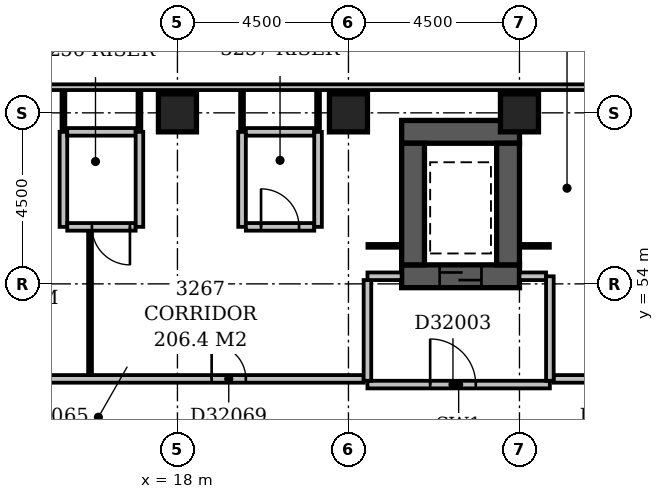
"""IFC4 building model, lengths in metres.
Left out: names, types, materials, properties, quantities, classifications, styles, units other than length and angle.
Written with IfcOpenShell. Run it as: python <this file> out.ifc"""

import sys

from ifc_helpers import new_model, si_unit, direction, frame, frame_2d, origin, origin_2d, place, context, subcontext, project, spatial, rectangle, extrude, element, fill, save


model = new_model("IFC4")
c1 = context("Model", 3, precision=1e-05, world=origin(), true_north=direction((0.0, 1.0)))
c2 = subcontext(c1, "Body", "Model", "MODEL_VIEW")
j1 = project(units=[si_unit("LENGTHUNIT", "METRE"), si_unit("PLANEANGLEUNIT", "RADIAN")], contexts=[c1])
p1 = place(None, origin())
s1 = spatial("IfcSite", under=j1, at=p1, CompositionType="ELEMENT")
p2 = place(p1, origin())
s2 = spatial("IfcBuilding", under=s1, at=p2, CompositionType="ELEMENT")
p3 = place(p2, frame((0.0, 0.0, 130.4)))
s3 = spatial("IfcBuildingStorey", under=s2, at=p3, CompositionType="ELEMENT", Elevation=130.4)
p4 = place(p3, frame((23.9, 54.2, -0.3), z_axis=(0.0, 0.0, 1.0), x_axis=(1.0, 0.0, 0.0)))
e1 = element("IfcWall", 1, at=p4, inside=s3, PredefinedType="SHEAR", context=c2, shape_type="SweptSolid", body=[
    extrude(rectangle(XDim=3.1, YDim=0.6, at=frame_2d((1.55, 0.0))), origin(), (0.0, 0.0, 1.0), 3.6),
])
p5 = place(p4, frame((1.0, 0.0, 0.3)))
e2 = element("IfcOpeningElement", 2, at=p5, cuts=e1, PredefinedType="OPENING", context=c2, shape_type="SweptSolid", body=[
    extrude(rectangle(XDim=1.1, YDim=2.1, at=frame_2d((0.55, 1.05))), frame((0.0, 0.312, 0.0), z_axis=(0.0, -1.0, 0.0), x_axis=(1.0, 0.0, 0.0)), (0.0, 0.0, 1.0), 0.624),
])
p6 = place(p3, frame((23.9, 58.0, -0.3), z_axis=(0.0, 0.0, 1.0), x_axis=(1.0, 0.0, 0.0)))
e3 = element("IfcWall", 3, at=p6, inside=s3, PredefinedType="SHEAR", context=c2, shape_type="SweptSolid", body=[
    extrude(rectangle(XDim=3.1, YDim=0.6, at=frame_2d((1.55, 0.0))), origin(), (0.0, 0.0, 1.0), 3.6),
])
for number, where, z_axis, x_axis in (
    (4, (24.2, 54.5, -0.3), (0.0, 0.0, 1.0), (0.0, 1.0, 0.0)),
    (5, (26.7, 54.5, -0.3), (0.0, 0.0, 1.0), (0.0, 1.0, 0.0)),
):
    element("IfcWall", number, at=place(p3, frame(where, z_axis=z_axis, x_axis=x_axis)), inside=s3, PredefinedType="SHEAR", context=c2, shape_type="SweptSolid", body=[
        extrude(rectangle(XDim=3.2, YDim=0.6, at=frame_2d((1.6, 0.0))), origin(), (0.0, 0.0, 1.0), 3.6),
    ])
for number, where, z_axis, x_axis in (
    (6, (18.0, 58.5, -0.3), (0.0, 0.0, 1.0), (1.0, 0.0, 0.0)),
    (7, (22.5, 58.5, -0.3), (0.0, 0.0, 1.0), (1.0, 0.0, 0.0)),
    (8, (27.0, 58.5, -0.3), (0.0, 0.0, 1.0), (1.0, 0.0, 0.0)),
):
    element("IfcColumn", number, at=place(p3, frame(where, z_axis=z_axis, x_axis=x_axis)), inside=s3, PredefinedType="COLUMN", context=c2, shape_type="SweptSolid", body=[
        extrude(rectangle(XDim=1.0, YDim=1.0, at=origin_2d()), origin(), (0.0, 0.0, 1.0), 3.6),
    ])
p7 = place(p3, frame((68.1, 59.175, 0.0), z_axis=(0.0, 0.0, 1.0), x_axis=(-1.0, 0.0, 0.0)))
e9 = element("IfcWall", 9, at=p7, inside=s3, PredefinedType="STANDARD", context=c2, shape_type="SweptSolid", body=[
    extrude(rectangle(XDim=68.85, YDim=0.15, at=frame_2d((34.425, 0.0))), origin(), (0.0, 0.0, 1.0), 2.7),
])
p8 = place(p3, frame((23.0, 51.35, 0.0), z_axis=(0.0, 0.0, 1.0), x_axis=(1.0, 0.0, 0.0)))
e10 = element("IfcWall", 10, at=p8, inside=s3, PredefinedType="PARTITIONING", context=c2, shape_type="SweptSolid", body=[
    extrude(rectangle(XDim=4.8, YDim=0.2, at=frame_2d((2.4, 0.0))), origin(), (0.0, 0.0, 1.0), 3.3),
])
p9 = place(p8, frame((1.65, 0.0, 0.0)))
e11 = element("IfcOpeningElement", 11, at=p9, cuts=e10, PredefinedType="OPENING", context=c2, shape_type="SweptSolid", body=[
    extrude(rectangle(XDim=1.2, YDim=2.1, at=frame_2d((0.6, 1.05))), frame((0.0, 0.112, 0.0), z_axis=(0.0, -1.0, 0.0), x_axis=(1.0, 0.0, 0.0)), (0.0, 0.0, 1.0), 0.224),
])
p10 = place(p3, frame((27.8, 51.45, 0.0), z_axis=(0.0, 0.0, 1.0), x_axis=(0.0, 1.0, 0.0)))
e12 = element("IfcWall", 12, at=p10, inside=s3, PredefinedType="PARTITIONING", context=c2, shape_type="SweptSolid", body=[
    extrude(rectangle(XDim=2.75, YDim=0.2, at=frame_2d((1.375, 0.0))), origin(), (0.0, 0.0, 1.0), 3.3),
])
p11 = place(p3, frame((23.0, 54.2, 0.0), z_axis=(0.0, 0.0, 1.0), x_axis=(1.0, 0.0, 0.0)))
e13 = element("IfcWall", 13, at=p11, inside=s3, PredefinedType="PARTITIONING", context=c2, shape_type="SweptSolid", body=[
    extrude(rectangle(XDim=0.9, YDim=0.2, at=frame_2d((0.45, 0.0))), origin(), (0.0, 0.0, 1.0), 3.3),
])
p12 = place(p3, frame((27.0, 54.2, 0.0), z_axis=(0.0, 0.0, 1.0), x_axis=(1.0, 0.0, 0.0)))
e14 = element("IfcWall", 14, at=p12, inside=s3, PredefinedType="PARTITIONING", context=c2, shape_type="SweptSolid", body=[
    extrude(rectangle(XDim=0.7, YDim=0.2, at=frame_2d((0.35, 0.0))), origin(), (0.0, 0.0, 1.0), 3.3),
])
p13 = place(p3, frame((23.0, 51.45, 0.0), z_axis=(0.0, 0.0, 1.0), x_axis=(0.0, 1.0, 0.0)))
e15 = element("IfcWall", 15, at=p13, inside=s3, PredefinedType="PARTITIONING", context=c2, shape_type="SweptSolid", body=[
    extrude(rectangle(XDim=2.65, YDim=0.2, at=frame_2d((1.325, 0.0))), origin(), (0.0, 0.0, 1.0), 3.3),
])
p14 = place(p3, frame((7.6, 51.5, 0.0), z_axis=(0.0, 0.0, 1.0), x_axis=(1.0, 0.0, 0.0)))
e16 = element("IfcWall", 16, at=p14, inside=s3, PredefinedType="PARTITIONING", context=c2, shape_type="SweptSolid", body=[
    extrude(rectangle(XDim=15.3, YDim=0.2, at=frame_2d((7.65, 0.0))), origin(), (0.0, 0.0, 1.0), 3.3),
])
p15 = place(p14, frame((3.55, 0.0, 0.0)))
e17 = element("IfcOpeningElement", 17, at=p15, cuts=e16, PredefinedType="OPENING", context=c2, shape_type="SweptSolid", body=[
    extrude(rectangle(XDim=0.9, YDim=2.1, at=frame_2d((0.45, 1.05))), frame((0.0, 0.112, 0.0), z_axis=(0.0, -1.0, 0.0), x_axis=(1.0, 0.0, 0.0)), (0.0, 0.0, 1.0), 0.224),
])
p16 = place(p14, frame((11.3, 0.0, 0.0)))
e18 = element("IfcOpeningElement", 18, at=p16, cuts=e16, PredefinedType="OPENING", context=c2, shape_type="SweptSolid", body=[
    extrude(rectangle(XDim=0.9, YDim=2.1, at=frame_2d((0.45, 1.05))), frame((0.0, 0.112, 0.0), z_axis=(0.0, -1.0, 0.0), x_axis=(1.0, 0.0, 0.0)), (0.0, 0.0, 1.0), 0.224),
])
p17 = place(p3, frame((27.9, 51.5, 0.0), z_axis=(0.0, 0.0, 1.0), x_axis=(1.0, 0.0, 0.0)))
e19 = element("IfcWall", 19, at=p17, inside=s3, PredefinedType="PARTITIONING", context=c2, shape_type="SweptSolid", body=[
    extrude(rectangle(XDim=9.3, YDim=0.2, at=frame_2d((4.65, 0.0))), origin(), (0.0, 0.0, 1.0), 3.3),
])
p18 = place(p17, frame((1.5, 0.0, 0.0)))
e20 = element("IfcOpeningElement", 20, at=p18, cuts=e19, PredefinedType="OPENING", context=c2, shape_type="SweptSolid", body=[
    extrude(rectangle(XDim=1.0, YDim=2.1, at=frame_2d((0.5, 1.05))), frame((0.0, 0.112, 0.0), z_axis=(0.0, -1.0, 0.0), x_axis=(1.0, 0.0, 0.0)), (0.0, 0.0, 1.0), 0.224),
])
p19 = place(p17, frame((6.3, 0.0, 0.0)))
e21 = element("IfcOpeningElement", 21, at=p19, cuts=e19, PredefinedType="OPENING", context=c2, shape_type="SweptSolid", body=[
    extrude(rectangle(XDim=0.9, YDim=2.1, at=frame_2d((0.45, 1.05))), frame((0.0, 0.112, 0.0), z_axis=(0.0, -1.0, 0.0), x_axis=(1.0, 0.0, 0.0)), (0.0, 0.0, 1.0), 0.224),
])
p20 = place(p3, frame((15.7, 51.6, 0.0), z_axis=(0.0, 0.0, 1.0), x_axis=(0.0, 1.0, 0.0)))
e22 = element("IfcWall", 22, at=p20, inside=s3, PredefinedType="PARTITIONING", context=c2, shape_type="SweptSolid", body=[
    extrude(rectangle(XDim=3.8, YDim=0.1, at=frame_2d((1.9, 0.0))), origin(), (0.0, 0.0, 1.0), 3.3),
])
p21 = place(p3, frame((23.0, 55.0, 0.0), z_axis=(0.0, 0.0, 1.0), x_axis=(1.0, 0.0, 0.0)))
e23 = element("IfcWall", 23, at=p21, inside=s3, PredefinedType="PARTITIONING", context=c2, shape_type="SweptSolid", body=[
    extrude(rectangle(XDim=0.9, YDim=0.1, at=frame_2d((0.45, 0.0))), origin(), (0.0, 0.0, 1.0), 3.3),
])
p22 = place(p3, frame((27.0, 55.0, 0.0), z_axis=(0.0, 0.0, 1.0), x_axis=(1.0, 0.0, 0.0)))
e24 = element("IfcWall", 24, at=p22, inside=s3, PredefinedType="PARTITIONING", context=c2, shape_type="SweptSolid", body=[
    extrude(rectangle(XDim=0.8, YDim=0.1, at=frame_2d((0.4, 0.0))), origin(), (0.0, 0.0, 1.0), 3.3),
])
p23 = place(p3, frame((15.0, 55.5, 0.0), z_axis=(0.0, 0.0, 1.0), x_axis=(0.0, 1.0, 0.0)))
e25 = element("IfcWall", 25, at=p23, inside=s3, PredefinedType="PARTITIONING", context=c2, shape_type="SweptSolid", body=[
    extrude(rectangle(XDim=2.5, YDim=0.2, at=frame_2d((1.25, 0.0))), origin(), (0.0, 0.0, 1.0), 3.3),
])
p24 = place(p3, frame((15.1, 55.5, 0.0), z_axis=(0.0, 0.0, 1.0), x_axis=(1.0, 0.0, 0.0)))
e26 = element("IfcWall", 26, at=p24, inside=s3, PredefinedType="PARTITIONING", context=c2, shape_type="SweptSolid", body=[
    extrude(rectangle(XDim=1.8, YDim=0.2, at=frame_2d((0.9, 0.0))), origin(), (0.0, 0.0, 1.0), 3.3),
])
p25 = place(p24, frame((0.65, 0.0, 0.0)))
e27 = element("IfcOpeningElement", 27, at=p25, cuts=e26, PredefinedType="OPENING", context=c2, shape_type="SweptSolid", body=[
    extrude(rectangle(XDim=1.0, YDim=2.1, at=frame_2d((0.5, 1.05))), frame((0.0, 0.112, 0.0), z_axis=(0.0, -1.0, 0.0), x_axis=(1.0, 0.0, 0.0)), (0.0, 0.0, 1.0), 0.224),
])
for number, where, z_axis, x_axis in (
    (28, (17.0, 55.5, 0.0), (0.0, 0.0, 1.0), (0.0, 1.0, 0.0)),
    (29, (19.7, 55.5, 0.0), (0.0, 0.0, 1.0), (0.0, 1.0, 0.0)),
):
    element("IfcWall", number, at=place(p3, frame(where, z_axis=z_axis, x_axis=x_axis)), inside=s3, PredefinedType="PARTITIONING", context=c2, shape_type="SweptSolid", body=[
        extrude(rectangle(XDim=2.5, YDim=0.2, at=frame_2d((1.25, 0.0))), origin(), (0.0, 0.0, 1.0), 3.3),
    ])
p26 = place(p3, frame((19.8, 55.5, 0.0), z_axis=(0.0, 0.0, 1.0), x_axis=(1.0, 0.0, 0.0)))
e30 = element("IfcWall", 30, at=p26, inside=s3, PredefinedType="PARTITIONING", context=c2, shape_type="SweptSolid", body=[
    extrude(rectangle(XDim=1.8, YDim=0.2, at=frame_2d((0.9, 0.0))), origin(), (0.0, 0.0, 1.0), 3.3),
])
p27 = place(p26, frame((0.4, 0.0, 0.0)))
e31 = element("IfcOpeningElement", 31, at=p27, cuts=e30, PredefinedType="OPENING", context=c2, shape_type="SweptSolid", body=[
    extrude(rectangle(XDim=1.0, YDim=2.1, at=frame_2d((0.5, 1.05))), frame((0.0, 0.112, 0.0), z_axis=(0.0, -1.0, 0.0), x_axis=(1.0, 0.0, 0.0)), (0.0, 0.0, 1.0), 0.224),
])
p28 = place(p3, frame((21.7, 55.5, 0.0), z_axis=(0.0, 0.0, 1.0), x_axis=(0.0, 1.0, 0.0)))
e32 = element("IfcWall", 32, at=p28, inside=s3, PredefinedType="PARTITIONING", context=c2, shape_type="SweptSolid", body=[
    extrude(rectangle(XDim=2.5, YDim=0.2, at=frame_2d((1.25, 0.0))), origin(), (0.0, 0.0, 1.0), 3.3),
])
p29 = place(p3, frame((15.0, 58.0, 0.0), z_axis=(0.0, 0.0, 1.0), x_axis=(0.0, 1.0, 0.0)))
e33 = element("IfcWall", 33, at=p29, inside=s3, PredefinedType="PARTITIONING", context=c2, shape_type="SweptSolid", body=[
    extrude(rectangle(XDim=1.1, YDim=0.1, at=frame_2d((0.55, 0.0))), origin(), (0.0, 0.0, 1.0), 3.3),
])
p30 = place(p3, frame((15.1, 58.0, 0.0), z_axis=(0.0, 0.0, 1.0), x_axis=(1.0, 0.0, 0.0)))
e34 = element("IfcWall", 34, at=p30, inside=s3, PredefinedType="PARTITIONING", context=c2, shape_type="SweptSolid", body=[
    extrude(rectangle(XDim=1.8, YDim=0.2, at=frame_2d((0.9, 0.0))), origin(), (0.0, 0.0, 1.0), 3.3),
])
for number, where, z_axis, x_axis in (
    (35, (17.0, 58.0, 0.0), (0.0, 0.0, 1.0), (0.0, 1.0, 0.0)),
    (36, (19.7, 58.0, 0.0), (0.0, 0.0, 1.0), (0.0, 1.0, 0.0)),
):
    element("IfcWall", number, at=place(p3, frame(where, z_axis=z_axis, x_axis=x_axis)), inside=s3, PredefinedType="PARTITIONING", context=c2, shape_type="SweptSolid", body=[
        extrude(rectangle(XDim=1.1, YDim=0.1, at=frame_2d((0.55, 0.0))), origin(), (0.0, 0.0, 1.0), 3.3),
    ])
p31 = place(p3, frame((19.8, 58.0, 0.0), z_axis=(0.0, 0.0, 1.0), x_axis=(1.0, 0.0, 0.0)))
e37 = element("IfcWall", 37, at=p31, inside=s3, PredefinedType="PARTITIONING", context=c2, shape_type="SweptSolid", body=[
    extrude(rectangle(XDim=1.8, YDim=0.2, at=frame_2d((0.9, 0.0))), origin(), (0.0, 0.0, 1.0), 3.3),
])
p32 = place(p3, frame((21.7, 58.0, 0.0), z_axis=(0.0, 0.0, 1.0), x_axis=(0.0, 1.0, 0.0)))
e38 = element("IfcWall", 38, at=p32, inside=s3, PredefinedType="PARTITIONING", context=c2, shape_type="SweptSolid", body=[
    extrude(rectangle(XDim=1.1, YDim=0.1, at=frame_2d((0.55, 0.0))), origin(), (0.0, 0.0, 1.0), 3.3),
])
p33 = place(p9, origin())
e39 = element("IfcDoor", 39, at=p33, inside=s3, OperationType="SINGLE_SWING_LEFT", PredefinedType="DOOR", context=c2, shape_type="SweptSolid", body=[
    extrude(rectangle(XDim=1.2, YDim=2.1, at=frame_2d((0.6, 1.05))), frame((0.0, 0.025, 0.0), z_axis=(0.0, -1.0, 0.0), x_axis=(1.0, 0.0, 0.0)), (0.0, 0.0, 1.0), 0.05),
])
fill(e11, e39)
p34 = place(p5, origin())
e40 = element("IfcDoor", 40, at=p34, inside=s3, OperationType="SLIDING_TO_LEFT", PredefinedType="DOOR", context=c2, shape_type="SweptSolid", body=[
    extrude(rectangle(XDim=1.1, YDim=2.1, at=frame_2d((0.55, 1.05))), frame((0.0, 0.025, 0.0), z_axis=(0.0, -1.0, 0.0), x_axis=(1.0, 0.0, 0.0)), (0.0, 0.0, 1.0), 0.05),
])
fill(e2, e40)
p35 = place(p16, origin())
e41 = element("IfcDoor", 41, at=p35, inside=s3, OperationType="SINGLE_SWING_LEFT", PredefinedType="DOOR", context=c2, shape_type="SweptSolid", body=[
    extrude(rectangle(XDim=0.9, YDim=2.1, at=frame_2d((0.45, 1.05))), frame((0.0, 0.025, 0.0), z_axis=(0.0, -1.0, 0.0), x_axis=(1.0, 0.0, 0.0)), (0.0, 0.0, 1.0), 0.05),
])
fill(e18, e41)
p36 = place(p25, origin())
e42 = element("IfcDoor", 42, at=p36, inside=s3, OperationType="SINGLE_SWING_RIGHT", PredefinedType="DOOR", context=c2, shape_type="SweptSolid", body=[
    extrude(rectangle(XDim=1.0, YDim=2.1, at=frame_2d((0.5, 1.05))), frame((0.0, 0.025, 0.0), z_axis=(0.0, -1.0, 0.0), x_axis=(1.0, 0.0, 0.0)), (0.0, 0.0, 1.0), 0.05),
])
fill(e27, e42)
p37 = place(p27, origin())
e43 = element("IfcDoor", 43, at=p37, inside=s3, OperationType="SINGLE_SWING_LEFT", PredefinedType="DOOR", context=c2, shape_type="SweptSolid", body=[
    extrude(rectangle(XDim=1.0, YDim=2.1, at=frame_2d((0.5, 1.05))), frame((0.0, 0.025, 0.0), z_axis=(0.0, -1.0, 0.0), x_axis=(1.0, 0.0, 0.0)), (0.0, 0.0, 1.0), 0.05),
])
fill(e31, e43)
save(model, sys.argv[1])
